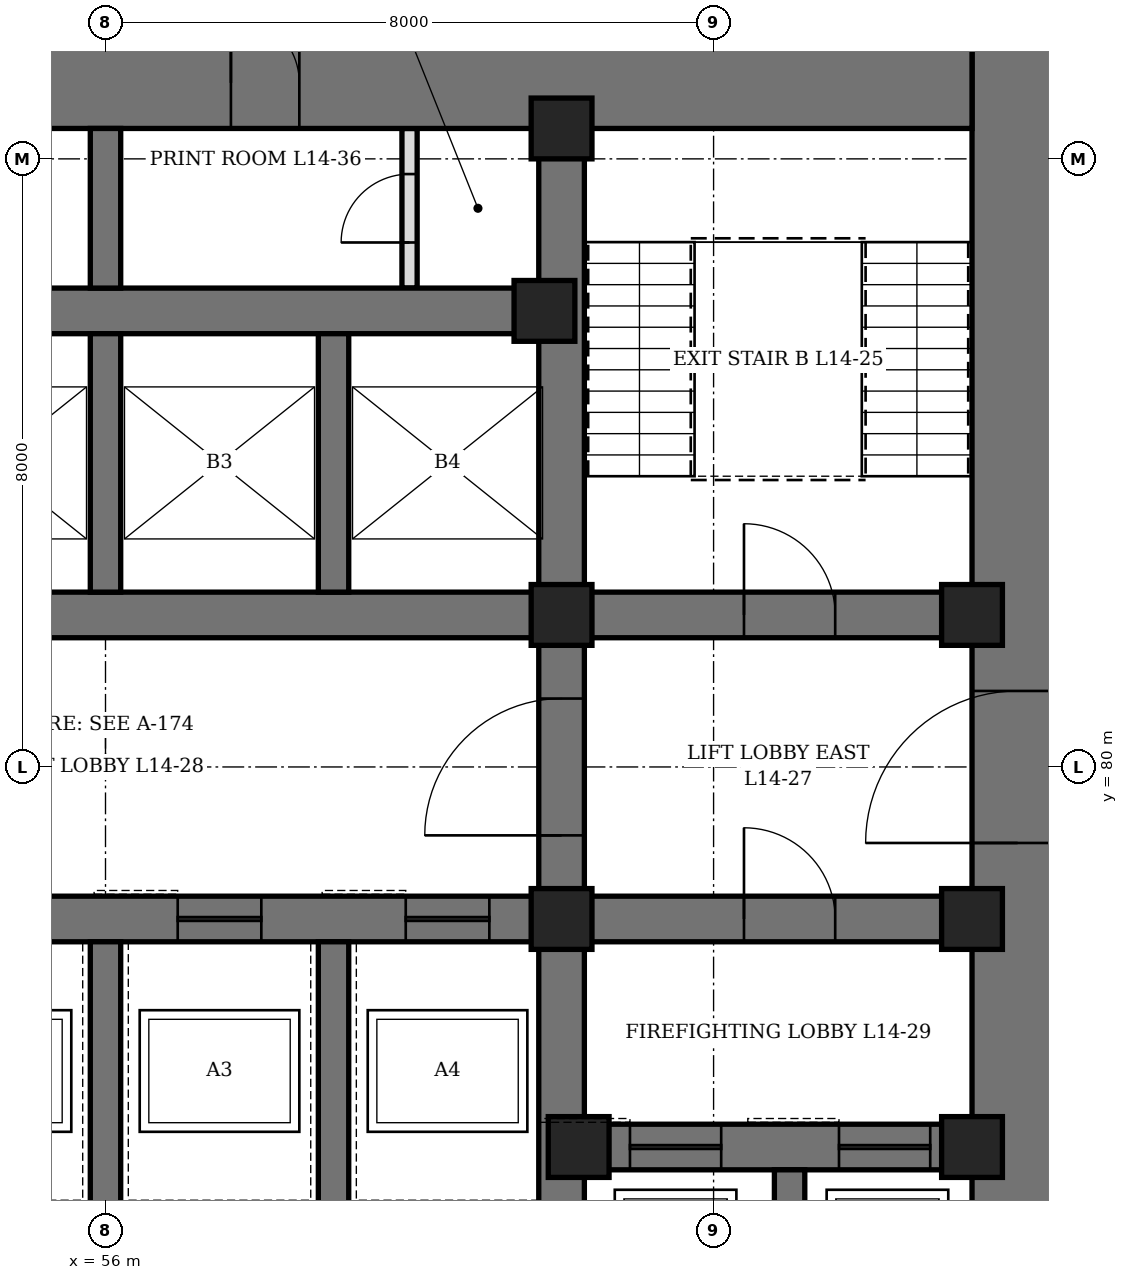
"""IFC4 building model, lengths in metres.
Left out: names, types, materials, properties, quantities, classifications, styles, units other than length and angle.
Written with IfcOpenShell. Run it as: python <this file> out.ifc"""

import sys

from ifc_helpers import new_model, si_unit, direction, frame, frame_2d, origin, origin_2d, place, context, subcontext, project, spatial, rectangle, hollow_rectangle, extrude, element, fill, save


model = new_model("IFC4")
c1 = context("Model", 3, precision=1e-05, world=origin(), true_north=direction((0.0, 1.0)))
c2 = subcontext(c1, "Body", "Model", "MODEL_VIEW")
j1 = project(units=[si_unit("LENGTHUNIT", "METRE"), si_unit("PLANEANGLEUNIT", "RADIAN")], contexts=[c1])
p1 = place(None, origin())
s1 = spatial("IfcSite", under=j1, at=p1, CompositionType="ELEMENT")
p2 = place(p1, origin())
s2 = spatial("IfcBuilding", under=s1, at=p2, CompositionType="ELEMENT")
p3 = place(p2, frame((0.0, 0.0, 68.5)))
s3 = spatial("IfcBuildingStorey", under=s2, at=p3, CompositionType="ELEMENT", Elevation=68.5)
p4 = place(p3, frame((68.0, 70.4, 0.0), z_axis=(0.0, 0.0, 1.0), x_axis=(0.0, 1.0, 0.0)))
e1 = element("IfcWall", 1, at=p4, inside=s3, PredefinedType="SHEAR", context=c2, shape_type="SweptSolid", body=[
    extrude(rectangle(XDim=19.2, YDim=1.2, at=frame_2d((9.6, 0.0))), origin(), (0.0, 0.0, 1.0), 4.2),
])
p5 = place(p4, frame((8.6, 0.0, 0.0)))
e2 = element("IfcOpeningElement", 2, at=p5, cuts=e1, PredefinedType="OPENING", context=c2, shape_type="SweptSolid", body=[
    extrude(rectangle(XDim=2.0, YDim=2.4, at=frame_2d((1.0, 1.2))), frame((0.0, 0.61, 0.0), z_axis=(0.0, -1.0, 0.0), x_axis=(1.0, 0.0, 0.0)), (0.0, 0.0, 1.0), 1.22),
])
p6 = place(p3, frame((44.6, 89.0, 0.0), z_axis=(0.0, 0.0, 1.0), x_axis=(1.0, 0.0, 0.0)))
e3 = element("IfcWall", 3, at=p6, inside=s3, PredefinedType="SHEAR", context=c2, shape_type="SweptSolid", body=[
    extrude(rectangle(XDim=22.8, YDim=1.2, at=frame_2d((11.4, 0.0))), origin(), (0.0, 0.0, 1.0), 4.2),
])
p7 = place(p6, frame((9.2, 0.0, 0.0)))
e4 = element("IfcOpeningElement", 4, at=p7, cuts=e3, PredefinedType="OPENING", context=c2, shape_type="SweptSolid", body=[
    extrude(rectangle(XDim=1.0, YDim=2.1, at=frame_2d((0.5, 1.05))), frame((0.0, 0.61, 0.0), z_axis=(0.0, -1.0, 0.0), x_axis=(1.0, 0.0, 0.0)), (0.0, 0.0, 1.0), 1.22),
])
p8 = place(p6, frame((6.45, 0.0, 0.0)))
e5 = element("IfcOpeningElement", 5, at=p8, cuts=e3, PredefinedType="OPENING", context=c2, shape_type="SweptSolid", body=[
    extrude(rectangle(XDim=0.9, YDim=2.1, at=frame_2d((0.45, 1.05))), frame((0.0, 0.61, 0.0), z_axis=(0.0, -1.0, 0.0), x_axis=(1.0, 0.0, 0.0)), (0.0, 0.0, 1.0), 1.22),
])
p9 = place(p6, frame((13.05, 0.0, 0.0)))
e6 = element("IfcOpeningElement", 6, at=p9, cuts=e3, PredefinedType="OPENING", context=c2, shape_type="SweptSolid", body=[
    extrude(rectangle(XDim=0.9, YDim=2.1, at=frame_2d((0.45, 1.05))), frame((0.0, 0.61, 0.0), z_axis=(0.0, -1.0, 0.0), x_axis=(1.0, 0.0, 0.0)), (0.0, 0.0, 1.0), 1.22),
])
p10 = place(p3, frame((62.0, 71.6, 0.0), z_axis=(0.0, 0.0, 1.0), x_axis=(0.0, 1.0, 0.0)))
e7 = element("IfcWall", 7, at=p10, inside=s3, PredefinedType="SHEAR", context=c2, shape_type="SweptSolid", body=[
    extrude(rectangle(XDim=16.8, YDim=0.6, at=frame_2d((8.4, 0.0))), origin(), (0.0, 0.0, 1.0), 4.2),
])
p11 = place(p10, frame((7.5, 0.0, 0.0)))
e8 = element("IfcOpeningElement", 8, at=p11, cuts=e7, PredefinedType="OPENING", context=c2, shape_type="SweptSolid", body=[
    extrude(rectangle(XDim=1.8, YDim=2.4, at=frame_2d((0.9, 1.2))), frame((0.0, 0.31, 0.0), z_axis=(0.0, -1.0, 0.0), x_axis=(1.0, 0.0, 0.0)), (0.0, 0.0, 1.0), 0.62),
])
p12 = place(p3, frame((62.3, 75.0, 0.0), z_axis=(0.0, 0.0, 1.0), x_axis=(1.0, 0.0, 0.0)))
e9 = element("IfcWall", 9, at=p12, inside=s3, PredefinedType="SHEAR", context=c2, shape_type="SweptSolid", body=[
    extrude(rectangle(XDim=5.1, YDim=0.6, at=frame_2d((2.55, 0.0))), origin(), (0.0, 0.0, 1.0), 4.2),
])
p13 = place(p12, frame((0.6, 0.0, 0.0)))
e10 = element("IfcOpeningElement", 10, at=p13, cuts=e9, PredefinedType="OPENING", context=c2, shape_type="SweptSolid", body=[
    extrude(rectangle(XDim=1.2, YDim=2.2, at=frame_2d((0.6, 1.1))), frame((0.0, 0.31, 0.0), z_axis=(0.0, -1.0, 0.0), x_axis=(1.0, 0.0, 0.0)), (0.0, 0.0, 1.0), 0.62),
])
p14 = place(p12, frame((3.35, 0.0, 0.0)))
e11 = element("IfcOpeningElement", 11, at=p14, cuts=e9, PredefinedType="OPENING", context=c2, shape_type="SweptSolid", body=[
    extrude(rectangle(XDim=1.2, YDim=2.2, at=frame_2d((0.6, 1.1))), frame((0.0, 0.31, 0.0), z_axis=(0.0, -1.0, 0.0), x_axis=(1.0, 0.0, 0.0)), (0.0, 0.0, 1.0), 0.62),
])
p15 = place(p3, frame((62.3, 78.0, 0.0), z_axis=(0.0, 0.0, 1.0), x_axis=(1.0, 0.0, 0.0)))
e12 = element("IfcWall", 12, at=p15, inside=s3, PredefinedType="SHEAR", context=c2, shape_type="SweptSolid", body=[
    extrude(rectangle(XDim=5.1, YDim=0.6, at=frame_2d((2.55, 0.0))), origin(), (0.0, 0.0, 1.0), 4.2),
])
p16 = place(p15, frame((2.1, 0.0, 0.0)))
e13 = element("IfcOpeningElement", 13, at=p16, cuts=e12, PredefinedType="OPENING", context=c2, shape_type="SweptSolid", body=[
    extrude(rectangle(XDim=1.2, YDim=2.1, at=frame_2d((0.6, 1.05))), frame((0.0, 0.31, 0.0), z_axis=(0.0, -1.0, 0.0), x_axis=(1.0, 0.0, 0.0)), (0.0, 0.0, 1.0), 0.62),
])
p17 = place(p3, frame((62.3, 82.0, 0.0), z_axis=(0.0, 0.0, 1.0), x_axis=(1.0, 0.0, 0.0)))
e14 = element("IfcWall", 14, at=p17, inside=s3, PredefinedType="SHEAR", context=c2, shape_type="SweptSolid", body=[
    extrude(rectangle(XDim=5.1, YDim=0.6, at=frame_2d((2.55, 0.0))), origin(), (0.0, 0.0, 1.0), 4.2),
])
p18 = place(p17, frame((2.1, 0.0, 0.0)))
e15 = element("IfcOpeningElement", 15, at=p18, cuts=e14, PredefinedType="OPENING", context=c2, shape_type="SweptSolid", body=[
    extrude(rectangle(XDim=1.2, YDim=2.1, at=frame_2d((0.6, 1.05))), frame((0.0, 0.31, 0.0), z_axis=(0.0, -1.0, 0.0), x_axis=(1.0, 0.0, 0.0)), (0.0, 0.0, 1.0), 0.62),
])
p19 = place(p3, frame((50.3, 78.0, 0.0), z_axis=(0.0, 0.0, 1.0), x_axis=(1.0, 0.0, 0.0)))
e16 = element("IfcWall", 16, at=p19, inside=s3, PredefinedType="SHEAR", context=c2, shape_type="SweptSolid", body=[
    extrude(rectangle(XDim=11.4, YDim=0.6, at=frame_2d((5.7, 0.0))), origin(), (0.0, 0.0, 1.0), 4.2),
])
p20 = place(p19, frame((0.65, 0.0, 0.0)))
e17 = element("IfcOpeningElement", 17, at=p20, cuts=e16, PredefinedType="OPENING", context=c2, shape_type="SweptSolid", body=[
    extrude(rectangle(XDim=1.1, YDim=2.2, at=frame_2d((0.55, 1.1))), frame((0.0, 0.31, 0.0), z_axis=(0.0, -1.0, 0.0), x_axis=(1.0, 0.0, 0.0)), (0.0, 0.0, 1.0), 0.62),
])
p21 = place(p19, frame((3.65, 0.0, 0.0)))
e18 = element("IfcOpeningElement", 18, at=p21, cuts=e16, PredefinedType="OPENING", context=c2, shape_type="SweptSolid", body=[
    extrude(rectangle(XDim=1.1, YDim=2.2, at=frame_2d((0.55, 1.1))), frame((0.0, 0.31, 0.0), z_axis=(0.0, -1.0, 0.0), x_axis=(1.0, 0.0, 0.0)), (0.0, 0.0, 1.0), 0.62),
])
p22 = place(p19, frame((6.65, 0.0, 0.0)))
e19 = element("IfcOpeningElement", 19, at=p22, cuts=e16, PredefinedType="OPENING", context=c2, shape_type="SweptSolid", body=[
    extrude(rectangle(XDim=1.1, YDim=2.2, at=frame_2d((0.55, 1.1))), frame((0.0, 0.31, 0.0), z_axis=(0.0, -1.0, 0.0), x_axis=(1.0, 0.0, 0.0)), (0.0, 0.0, 1.0), 0.62),
])
p23 = place(p19, frame((9.65, 0.0, 0.0)))
e20 = element("IfcOpeningElement", 20, at=p23, cuts=e16, PredefinedType="OPENING", context=c2, shape_type="SweptSolid", body=[
    extrude(rectangle(XDim=1.1, YDim=2.2, at=frame_2d((0.55, 1.1))), frame((0.0, 0.31, 0.0), z_axis=(0.0, -1.0, 0.0), x_axis=(1.0, 0.0, 0.0)), (0.0, 0.0, 1.0), 0.62),
])
for number, where, z_axis, x_axis in (
    (21, (50.3, 82.0, 0.0), (0.0, 0.0, 1.0), (1.0, 0.0, 0.0)),
    (22, (50.3, 86.0, 0.0), (0.0, 0.0, 1.0), (1.0, 0.0, 0.0)),
):
    element("IfcWall", number, at=place(p3, frame(where, z_axis=z_axis, x_axis=x_axis)), inside=s3, PredefinedType="SHEAR", context=c2, shape_type="SweptSolid", body=[
        extrude(rectangle(XDim=11.4, YDim=0.6, at=frame_2d((5.7, 0.0))), origin(), (0.0, 0.0, 1.0), 4.2),
    ])
p24 = place(p3, frame((56.0, 74.2, 0.0), z_axis=(0.0, 0.0, 1.0), x_axis=(0.0, 1.0, 0.0)))
e23 = element("IfcWall", 23, at=p24, inside=s3, PredefinedType="SHEAR", context=c2, shape_type="SweptSolid", body=[
    extrude(rectangle(XDim=3.5, YDim=0.4, at=frame_2d((1.75, 0.0))), origin(), (0.0, 0.0, 1.0), 4.2),
])
p25 = place(p3, frame((56.0, 82.3, 0.0), z_axis=(0.0, 0.0, 1.0), x_axis=(0.0, 1.0, 0.0)))
e24 = element("IfcWall", 24, at=p25, inside=s3, PredefinedType="SHEAR", context=c2, shape_type="SweptSolid", body=[
    extrude(rectangle(XDim=3.4, YDim=0.4, at=frame_2d((1.7, 0.0))), origin(), (0.0, 0.0, 1.0), 4.2),
])
p26 = place(p3, frame((59.0, 74.2, 0.0), z_axis=(0.0, 0.0, 1.0), x_axis=(0.0, 1.0, 0.0)))
e25 = element("IfcWall", 25, at=p26, inside=s3, PredefinedType="SHEAR", context=c2, shape_type="SweptSolid", body=[
    extrude(rectangle(XDim=3.5, YDim=0.4, at=frame_2d((1.75, 0.0))), origin(), (0.0, 0.0, 1.0), 4.2),
])
p27 = place(p3, frame((59.0, 82.3, 0.0), z_axis=(0.0, 0.0, 1.0), x_axis=(0.0, 1.0, 0.0)))
e26 = element("IfcWall", 26, at=p27, inside=s3, PredefinedType="SHEAR", context=c2, shape_type="SweptSolid", body=[
    extrude(rectangle(XDim=3.4, YDim=0.4, at=frame_2d((1.7, 0.0))), origin(), (0.0, 0.0, 1.0), 4.2),
])
p28 = place(p3, frame((65.0, 71.6, 0.0), z_axis=(0.0, 0.0, 1.0), x_axis=(0.0, 1.0, 0.0)))
e27 = element("IfcWall", 27, at=p28, inside=s3, PredefinedType="SHEAR", context=c2, shape_type="SweptSolid", body=[
    extrude(rectangle(XDim=3.1, YDim=0.4, at=frame_2d((1.55, 0.0))), origin(), (0.0, 0.0, 1.0), 4.2),
])
p29 = place(p3, frame((56.0, 86.3, 0.0), z_axis=(0.0, 0.0, 1.0), x_axis=(0.0, 1.0, 0.0)))
e28 = element("IfcWall", 28, at=p29, inside=s3, PredefinedType="SHEAR", context=c2, shape_type="SweptSolid", body=[
    extrude(rectangle(XDim=2.1, YDim=0.4, at=frame_2d((1.05, 0.0))), origin(), (0.0, 0.0, 1.0), 4.2),
])
for number, where, z_axis, x_axis in (
    (29, (61.775, 86.0, 0.0), (0.0, 0.0, 1.0), (1.0, 0.0, 0.0)),
    (30, (62.0, 78.0, 0.0), (0.0, 0.0, 1.0), (1.0, 0.0, 0.0)),
    (31, (62.0, 82.0, 0.0), (0.0, 0.0, 1.0), (1.0, 0.0, 0.0)),
    (32, (62.0, 88.4, 0.0), (0.0, 0.0, 1.0), (1.0, 0.0, 0.0)),
    (33, (62.225, 75.0, 0.0), (0.0, 0.0, 1.0), (1.0, 0.0, 0.0)),
    (34, (67.4, 75.0, 0.0), (0.0, 0.0, 1.0), (1.0, 0.0, 0.0)),
    (35, (67.4, 78.0, 0.0), (0.0, 0.0, 1.0), (1.0, 0.0, 0.0)),
    (36, (67.4, 82.0, 0.0), (0.0, 0.0, 1.0), (1.0, 0.0, 0.0)),
):
    element("IfcColumn", number, at=place(p3, frame(where, z_axis=z_axis, x_axis=x_axis)), inside=s3, PredefinedType="COLUMN", context=c2, shape_type="SweptSolid", body=[
        extrude(hollow_rectangle(XDim=0.8, YDim=0.8, WallThickness=0.1, at=origin_2d()), origin(), (0.0, 0.0, 1.0), 4.2),
    ])
p30 = place(p3, frame((60.0, 86.3, 0.0), z_axis=(0.0, 0.0, 1.0), x_axis=(0.0, 1.0, 0.0)))
e37 = element("IfcWall", 37, at=p30, inside=s3, PredefinedType="PARTITIONING", context=c2, shape_type="SweptSolid", body=[
    extrude(rectangle(XDim=2.1, YDim=0.2, at=frame_2d((1.05, 0.0))), origin(), (0.0, 0.0, 1.0), 4.04),
])
p31 = place(p30, frame((0.6, 0.0, 0.0)))
e38 = element("IfcOpeningElement", 38, at=p31, cuts=e37, PredefinedType="OPENING", context=c2, shape_type="SweptSolid", body=[
    extrude(rectangle(XDim=0.9, YDim=2.1, at=frame_2d((0.45, 1.05))), frame((0.0, 0.11, 0.0), z_axis=(0.0, -1.0, 0.0), x_axis=(1.0, 0.0, 0.0)), (0.0, 0.0, 1.0), 0.22),
])
p32 = place(p9, origin())
e39 = element("IfcDoor", 39, at=p32, inside=s3, OperationType="SINGLE_SWING_LEFT", PredefinedType="DOOR", context=c2, shape_type="SweptSolid", body=[
    extrude(rectangle(XDim=0.9, YDim=2.1, at=frame_2d((0.45, 1.05))), frame((0.0, 0.35, 0.0), z_axis=(0.0, -1.0, 0.0), x_axis=(1.0, 0.0, 0.0)), (0.0, 0.0, 1.0), 0.7),
])
fill(e6, e39)
p33 = place(p31, origin())
e40 = element("IfcDoor", 40, at=p33, inside=s3, OperationType="SINGLE_SWING_LEFT", PredefinedType="DOOR", context=c2, shape_type="SweptSolid", body=[
    extrude(rectangle(XDim=0.9, YDim=2.1, at=frame_2d((0.45, 1.05))), frame((0.0, 0.1, 0.0), z_axis=(0.0, -1.0, 0.0), x_axis=(1.0, 0.0, 0.0)), (0.0, 0.0, 1.0), 0.199),
])
fill(e38, e40)
p34 = place(p18, origin())
e41 = element("IfcDoor", 41, at=p34, inside=s3, OperationType="SINGLE_SWING_LEFT", PredefinedType="DOOR", context=c2, shape_type="SweptSolid", body=[
    extrude(rectangle(XDim=1.2, YDim=2.1, at=frame_2d((0.6, 1.05))), frame((0.0, 0.3, 0.0), z_axis=(0.0, -1.0, 0.0), x_axis=(1.0, 0.0, 0.0)), (0.0, 0.0, 1.0), 0.6),
])
fill(e15, e41)
p35 = place(p5, origin())
e42 = element("IfcDoor", 42, at=p35, inside=s3, OperationType="DOUBLE_DOOR_SINGLE_SWING", PredefinedType="DOOR", context=c2, shape_type="SweptSolid", body=[
    extrude(rectangle(XDim=2.0, YDim=2.4, at=frame_2d((1.0, 1.2))), frame((0.0, 0.35, 0.0), z_axis=(0.0, -1.0, 0.0), x_axis=(1.0, 0.0, 0.0)), (0.0, 0.0, 1.0), 0.7),
])
fill(e2, e42)
p36 = place(p11, origin())
e43 = element("IfcDoor", 43, at=p36, inside=s3, OperationType="DOUBLE_DOOR_SINGLE_SWING", PredefinedType="DOOR", context=c2, shape_type="SweptSolid", body=[
    extrude(rectangle(XDim=1.8, YDim=2.4, at=frame_2d((0.9, 1.2))), frame((0.0, 0.3, 0.0), z_axis=(0.0, -1.0, 0.0), x_axis=(1.0, 0.0, 0.0)), (0.0, 0.0, 1.0), 0.6),
])
fill(e8, e43)
p37 = place(p16, origin())
e44 = element("IfcDoor", 44, at=p37, inside=s3, OperationType="SINGLE_SWING_RIGHT", PredefinedType="DOOR", context=c2, shape_type="SweptSolid", body=[
    extrude(rectangle(XDim=1.2, YDim=2.1, at=frame_2d((0.6, 1.05))), frame((0.0, 0.3, 0.0), z_axis=(0.0, -1.0, 0.0), x_axis=(1.0, 0.0, 0.0)), (0.0, 0.0, 1.0), 0.6),
])
fill(e13, e44)
p38 = place(p22, origin())
e45 = element("IfcDoor", 45, at=p38, inside=s3, OperationType="SLIDING_TO_LEFT", PredefinedType="DOOR", context=c2, shape_type="SweptSolid", body=[
    extrude(rectangle(XDim=1.1, YDim=2.2, at=frame_2d((0.55, 1.1))), frame((0.0, 0.3, 0.0), z_axis=(0.0, -1.0, 0.0), x_axis=(1.0, 0.0, 0.0)), (0.0, 0.0, 1.0), 0.6),
])
fill(e19, e45)
p39 = place(p23, origin())
e46 = element("IfcDoor", 46, at=p39, inside=s3, OperationType="SLIDING_TO_LEFT", PredefinedType="DOOR", context=c2, shape_type="SweptSolid", body=[
    extrude(rectangle(XDim=1.1, YDim=2.2, at=frame_2d((0.55, 1.1))), frame((0.0, 0.3, 0.0), z_axis=(0.0, -1.0, 0.0), x_axis=(1.0, 0.0, 0.0)), (0.0, 0.0, 1.0), 0.6),
])
fill(e20, e46)
p40 = place(p13, origin())
e47 = element("IfcDoor", 47, at=p40, inside=s3, OperationType="SLIDING_TO_LEFT", PredefinedType="DOOR", context=c2, shape_type="SweptSolid", body=[
    extrude(rectangle(XDim=1.2, YDim=2.2, at=frame_2d((0.6, 1.1))), frame((0.0, 0.3, 0.0), z_axis=(0.0, -1.0, 0.0), x_axis=(1.0, 0.0, 0.0)), (0.0, 0.0, 1.0), 0.6),
])
fill(e10, e47)
p41 = place(p14, origin())
e48 = element("IfcDoor", 48, at=p41, inside=s3, OperationType="SLIDING_TO_LEFT", PredefinedType="DOOR", context=c2, shape_type="SweptSolid", body=[
    extrude(rectangle(XDim=1.2, YDim=2.2, at=frame_2d((0.6, 1.1))), frame((0.0, 0.3, 0.0), z_axis=(0.0, -1.0, 0.0), x_axis=(1.0, 0.0, 0.0)), (0.0, 0.0, 1.0), 0.6),
])
fill(e11, e48)
save(model, sys.argv[1])
